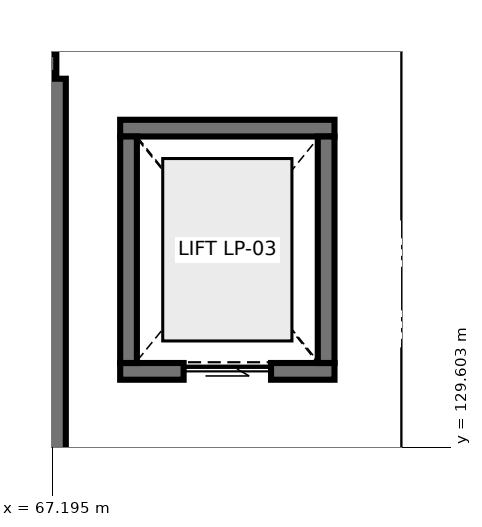
"""IFC4 building model, lengths in metres.
Left out: names, types, materials, properties, quantities, classifications, styles, units other than length and angle.
Written with IfcOpenShell. Run it as: python <this file> out.ifc"""

import sys

from ifc_helpers import new_model, si_unit, direction, frame, frame_2d, origin, place, context, subcontext, project, spatial, rectangle, extrude, element, fill, save


model = new_model("IFC4")
c1 = context("Model", 3, precision=1e-05, world=origin(), true_north=direction((0.0, 1.0)))
c2 = subcontext(c1, "Body", "Model", "MODEL_VIEW")
j1 = project(units=[si_unit("LENGTHUNIT", "METRE"), si_unit("PLANEANGLEUNIT", "RADIAN")], contexts=[c1])
p1 = place(None, origin())
s1 = spatial("IfcSite", under=j1, at=p1, CompositionType="ELEMENT")
p2 = place(p1, origin())
s2 = spatial("IfcBuilding", under=s1, at=p2, CompositionType="ELEMENT")
p3 = place(p2, frame((0.0, 0.0, 10.2)))
s3 = spatial("IfcBuildingStorey", under=s2, at=p3, CompositionType="ELEMENT", Elevation=10.2)
p4 = place(p3, frame((58.95, 134.65, 0.0), z_axis=(0.0, 0.0, 1.0), x_axis=(1.0, 0.0, 0.0)))
e1 = element("IfcWall", 1, at=p4, inside=s3, PredefinedType="SHEAR", context=c2, shape_type="SweptSolid", body=[
    extrude(rectangle(XDim=8.3, YDim=0.25, at=frame_2d((4.15, 0.0))), origin(), (0.0, 0.0, 1.0), 4.54),
])
p5 = place(p3, frame((67.25, 134.45, 0.0), z_axis=(0.0, 0.0, 1.0), x_axis=(0.0, -1.0, 0.0)))
e2 = element("IfcWall", 2, at=p5, inside=s3, PredefinedType="SHEAR", context=c2, shape_type="SweptSolid", body=[
    extrude(rectangle(XDim=5.3, YDim=0.25, at=frame_2d((2.65, 0.0))), origin(), (0.0, 0.0, 1.0), 4.54),
])
p6 = place(p3, frame((68.09, 130.6, 0.0), z_axis=(0.0, 0.0, 1.0), x_axis=(1.0, 0.0, 0.0)))
e3 = element("IfcWall", 3, at=p6, inside=s3, PredefinedType="SHEAR", context=c2, shape_type="SweptSolid", body=[
    extrude(rectangle(XDim=2.82, YDim=0.22, at=frame_2d((1.41, 0.0))), origin(), (0.0, 0.0, 1.0), 4.54),
])
p7 = place(p6, frame((0.835, 0.0, 0.0)))
e4 = element("IfcOpeningElement", 4, at=p7, cuts=e3, PredefinedType="OPENING", context=c2, shape_type="SweptSolid", body=[
    extrude(rectangle(XDim=1.15, YDim=2.2, at=frame_2d((0.575, 1.1))), frame((0.0, 0.12, 0.0), z_axis=(0.0, -1.0, 0.0), x_axis=(1.0, 0.0, 0.0)), (0.0, 0.0, 1.0), 0.24),
])
p8 = place(p3, frame((68.09, 133.8, 0.0), z_axis=(0.0, 0.0, 1.0), x_axis=(1.0, 0.0, 0.0)))
e5 = element("IfcWall", 5, at=p8, inside=s3, PredefinedType="SHEAR", context=c2, shape_type="SweptSolid", body=[
    extrude(rectangle(XDim=2.82, YDim=0.22, at=frame_2d((1.41, 0.0))), origin(), (0.0, 0.0, 1.0), 4.54),
])
for number, where, z_axis, x_axis in (
    (6, (68.2, 130.71, 0.0), (0.0, 0.0, 1.0), (0.0, 1.0, 0.0)),
    (7, (70.8, 130.71, 0.0), (0.0, 0.0, 1.0), (0.0, 1.0, 0.0)),
):
    element("IfcWall", number, at=place(p3, frame(where, z_axis=z_axis, x_axis=x_axis)), inside=s3, PredefinedType="SHEAR", context=c2, shape_type="SweptSolid", body=[
        extrude(rectangle(XDim=2.98, YDim=0.22, at=frame_2d((1.49, 0.0))), origin(), (0.0, 0.0, 1.0), 4.54),
    ])
p9 = place(p7, origin())
e8 = element("IfcDoor", 8, at=p9, inside=s3, OperationType="SLIDING_TO_LEFT", PredefinedType="DOOR", context=c2, shape_type="SweptSolid", body=[
    extrude(rectangle(XDim=1.15, YDim=2.2, at=frame_2d((0.575, 1.1))), frame((0.0, 0.025, 0.0), z_axis=(0.0, -1.0, 0.0), x_axis=(1.0, 0.0, 0.0)), (0.0, 0.0, 1.0), 0.05),
])
fill(e4, e8)
save(model, sys.argv[1])
